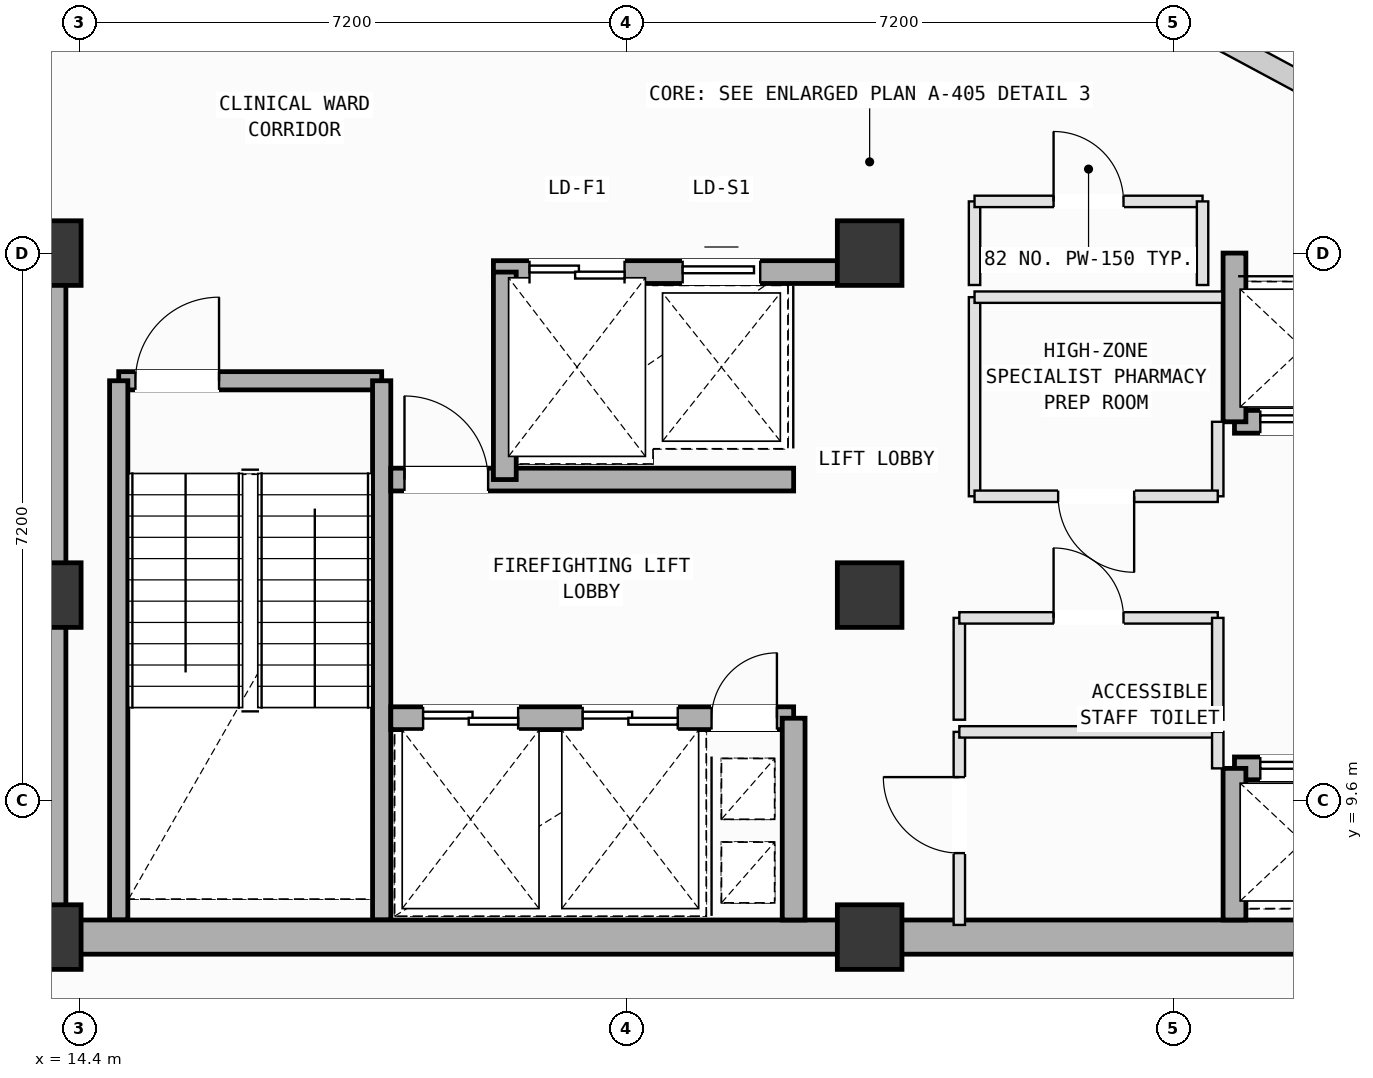
"""IFC4 building model, lengths in metres.
Left out: names, types, materials, properties, quantities, classifications, styles, units other than length and angle.
Written with IfcOpenShell. Run it as: python <this file> out.ifc"""

import sys

from ifc_helpers import new_model, si_unit, direction, frame, frame_2d, origin, origin_2d, place, context, subcontext, project, spatial, rectangle, extrude, element, fill, save


model = new_model("IFC4")
c1 = context("Model", 3, precision=1e-05, world=origin(), true_north=direction((0.0, 1.0)))
c2 = subcontext(c1, "Body", "Model", "MODEL_VIEW")
j1 = project(units=[si_unit("LENGTHUNIT", "METRE"), si_unit("PLANEANGLEUNIT", "RADIAN")], contexts=[c1])
p1 = place(None, origin())
s1 = spatial("IfcSite", under=j1, at=p1, CompositionType="ELEMENT")
p2 = place(p1, origin())
s2 = spatial("IfcBuilding", under=s1, at=p2, CompositionType="ELEMENT")
p3 = place(p2, frame((0.0, 0.0, 288.6)))
s3 = spatial("IfcBuildingStorey", under=s2, at=p3, CompositionType="ELEMENT", Elevation=288.6)
for number, where, z_axis, x_axis in (
    (1, (14.0, 7.8, 0.0), (0.0, 0.0, 1.0), (1.0, 0.0, 0.0)),
    (2, (14.0, 12.3, 0.0), (0.0, 0.0, 1.0), (1.0, 0.0, 0.0)),
    (3, (14.0, 16.8, 0.0), (0.0, 0.0, 1.0), (1.0, 0.0, 0.0)),
    (4, (24.8, 7.8, 0.0), (0.0, 0.0, 1.0), (1.0, 0.0, 0.0)),
    (5, (24.8, 12.3, 0.0), (0.0, 0.0, 1.0), (1.0, 0.0, 0.0)),
    (6, (24.8, 16.8, 0.0), (0.0, 0.0, 1.0), (1.0, 0.0, 0.0)),
):
    element("IfcColumn", number, at=place(p3, frame(where, z_axis=z_axis, x_axis=x_axis)), inside=s3, PredefinedType="COLUMN", context=c2, shape_type="SweptSolid", body=[
        extrude(rectangle(XDim=0.85, YDim=0.85, at=origin_2d()), origin(), (0.0, 0.0, 1.0), 4.0),
    ])
p4 = place(p3, frame((15.542, 5.601, 0.0), z_axis=(0.0, 0.0, 1.0), x_axis=(-0.88087851572, 0.473342413632, 0.0)))
e7 = element("IfcWall", 7, at=p4, inside=s3, PredefinedType="SOLIDWALL", context=c2, shape_type="SweptSolid", body=[
    extrude(rectangle(XDim=6.96, YDim=0.24, at=frame_2d((3.48, 0.0))), origin(), (0.0, 0.0, 1.0), 3.265),
])
p5 = place(p4, frame((3.597, 0.0, 0.0)))
e8 = element("IfcOpeningElement", 8, at=p5, cuts=e7, PredefinedType="OPENING", context=c2, shape_type="SweptSolid", body=[
    extrude(rectangle(XDim=1.1, YDim=2.15, at=frame_2d((0.55, 1.075))), frame((0.0, 0.13, 0.0), z_axis=(0.0, -1.0, 0.0), x_axis=(1.0, 0.0, 0.0)), (0.0, 0.0, 1.0), 0.26),
])
p6 = place(p3, frame((25.257, 21.847, 0.0), z_axis=(0.0, 0.0, 1.0), x_axis=(0.880904495482, -0.473294062756, 0.0)))
e9 = element("IfcWall", 9, at=p6, inside=s3, PredefinedType="SOLIDWALL", context=c2, shape_type="SweptSolid", body=[
    extrude(rectangle(XDim=6.958, YDim=0.28, at=frame_2d((3.479, 0.0))), origin(), (0.0, 0.0, 1.0), 3.165),
])
p7 = place(p3, frame((14.92, 15.12, 0.0), z_axis=(0.0, 0.0, 1.0), x_axis=(1.0, 0.0, 0.0)))
e10 = element("IfcWall", 10, at=p7, inside=s3, PredefinedType="SOLIDWALL", context=c2, shape_type="SweptSolid", body=[
    extrude(rectangle(XDim=3.46, YDim=0.24, at=frame_2d((1.73, 0.0))), origin(), (0.0, 0.0, 1.0), 3.78),
])
p8 = place(p7, frame((0.22, 0.0, 0.0)))
e11 = element("IfcOpeningElement", 11, at=p8, cuts=e10, PredefinedType="OPENING", context=c2, shape_type="SweptSolid", body=[
    extrude(rectangle(XDim=1.1, YDim=2.15, at=frame_2d((0.55, 1.075))), frame((0.0, 0.13, 0.0), z_axis=(0.0, -1.0, 0.0), x_axis=(1.0, 0.0, 0.0)), (0.0, 0.0, 1.0), 0.26),
])
for number, where, z_axis, x_axis in (
    (12, (18.38, 15.12, 0.0), (0.0, 0.0, 1.0), (0.0, -1.0, 0.0)),
    (13, (14.92, 8.025, 0.0), (0.0, 0.0, 1.0), (0.0, 1.0, 0.0)),
):
    element("IfcWall", number, at=place(p3, frame(where, z_axis=z_axis, x_axis=x_axis)), inside=s3, PredefinedType="SOLIDWALL", context=c2, shape_type="SweptSolid", body=[
        extrude(rectangle(XDim=7.095, YDim=0.24, at=frame_2d((3.548, 0.0))), origin(), (0.0, 0.0, 1.0), 3.78),
    ])
for number, where, z_axis, x_axis in (
    (14, (14.0, 7.8, 0.0), (0.0, 0.0, 1.0), (1.0, 0.0, 0.0)),
    (15, (24.8, 7.8, 0.0), (0.0, 0.0, 1.0), (1.0, 0.0, 0.0)),
):
    element("IfcWall", number, at=place(p3, frame(where, z_axis=z_axis, x_axis=x_axis)), inside=s3, PredefinedType="SHEAR", context=c2, shape_type="SweptSolid", body=[
        extrude(rectangle(XDim=10.8, YDim=0.45, at=frame_2d((5.4, 0.0))), origin(), (0.0, 0.0, 1.0), 3.78),
    ])
p9 = place(p3, frame((14.0, 16.8, 0.0), z_axis=(0.0, 0.0, 1.0), x_axis=(0.0, -1.0, 0.0)))
e16 = element("IfcWall", 16, at=p9, inside=s3, PredefinedType="SHEAR", context=c2, shape_type="SweptSolid", body=[
    extrude(rectangle(XDim=9.0, YDim=0.45, at=frame_2d((4.5, 0.0))), origin(), (0.0, 0.0, 1.0), 3.78),
])
p10 = place(p3, frame((19.85, 16.55, 0.0), z_axis=(0.0, 0.0, 1.0), x_axis=(1.0, 0.0, 0.0)))
e17 = element("IfcWall", 17, at=p10, inside=s3, PredefinedType="SOLIDWALL", context=c2, shape_type="SweptSolid", body=[
    extrude(rectangle(XDim=4.525, YDim=0.3, at=frame_2d((2.262, 0.0))), origin(), (0.0, 0.0, 1.0), 3.78),
])
p11 = place(p10, frame((0.475, 0.0, 0.0)))
e18 = element("IfcOpeningElement", 18, at=p11, cuts=e17, PredefinedType="OPENING", context=c2, shape_type="SweptSolid", body=[
    extrude(rectangle(XDim=1.25, YDim=2.18, at=frame_2d((0.625, 1.09))), frame((0.0, 0.16, 0.0), z_axis=(0.0, -1.0, 0.0), x_axis=(1.0, 0.0, 0.0)), (0.0, 0.0, 1.0), 0.32),
])
p12 = place(p10, frame((2.49, 0.0, 0.0)))
e19 = element("IfcOpeningElement", 19, at=p12, cuts=e17, PredefinedType="OPENING", context=c2, shape_type="SweptSolid", body=[
    extrude(rectangle(XDim=1.02, YDim=2.12, at=frame_2d((0.51, 1.06))), frame((0.0, 0.16, 0.0), z_axis=(0.0, -1.0, 0.0), x_axis=(1.0, 0.0, 0.0)), (0.0, 0.0, 1.0), 0.32),
])
p13 = place(p3, frame((18.5, 10.68, 0.0), z_axis=(0.0, 0.0, 1.0), x_axis=(1.0, 0.0, 0.0)))
e20 = element("IfcWall", 20, at=p13, inside=s3, PredefinedType="SOLIDWALL", context=c2, shape_type="SweptSolid", body=[
    extrude(rectangle(XDim=5.3, YDim=0.3, at=frame_2d((2.65, 0.0))), origin(), (0.0, 0.0, 1.0), 3.78),
])
p14 = place(p13, frame((4.22, 0.0, 0.0)))
e21 = element("IfcOpeningElement", 21, at=p14, cuts=e20, PredefinedType="OPENING", context=c2, shape_type="SweptSolid", body=[
    extrude(rectangle(XDim=0.86, YDim=2.06, at=frame_2d((0.43, 1.03))), frame((0.0, 0.16, 0.0), z_axis=(0.0, -1.0, 0.0), x_axis=(1.0, 0.0, 0.0)), (0.0, 0.0, 1.0), 0.32),
])
p15 = place(p13, frame((0.425, 0.0, 0.0)))
e22 = element("IfcOpeningElement", 22, at=p15, cuts=e20, PredefinedType="OPENING", context=c2, shape_type="SweptSolid", body=[
    extrude(rectangle(XDim=1.25, YDim=2.18, at=frame_2d((0.625, 1.09))), frame((0.0, 0.16, 0.0), z_axis=(0.0, -1.0, 0.0), x_axis=(1.0, 0.0, 0.0)), (0.0, 0.0, 1.0), 0.32),
])
p16 = place(p13, frame((2.525, 0.0, 0.0)))
e23 = element("IfcOpeningElement", 23, at=p16, cuts=e20, PredefinedType="OPENING", context=c2, shape_type="SweptSolid", body=[
    extrude(rectangle(XDim=1.25, YDim=2.18, at=frame_2d((0.625, 1.09))), frame((0.0, 0.16, 0.0), z_axis=(0.0, -1.0, 0.0), x_axis=(1.0, 0.0, 0.0)), (0.0, 0.0, 1.0), 0.32),
])
p17 = place(p3, frame((18.5, 13.82, 0.0), z_axis=(0.0, 0.0, 1.0), x_axis=(1.0, 0.0, 0.0)))
e24 = element("IfcWall", 24, at=p17, inside=s3, PredefinedType="SOLIDWALL", context=c2, shape_type="SweptSolid", body=[
    extrude(rectangle(XDim=5.3, YDim=0.3, at=frame_2d((2.65, 0.0))), origin(), (0.0, 0.0, 1.0), 3.78),
])
p18 = place(p17, frame((0.18, 0.0, 0.0)))
e25 = element("IfcOpeningElement", 25, at=p18, cuts=e24, PredefinedType="OPENING", context=c2, shape_type="SweptSolid", body=[
    extrude(rectangle(XDim=1.1, YDim=2.15, at=frame_2d((0.55, 1.075))), frame((0.0, 0.16, 0.0), z_axis=(0.0, -1.0, 0.0), x_axis=(1.0, 0.0, 0.0)), (0.0, 0.0, 1.0), 0.32),
])
p19 = place(p3, frame((23.8, 8.025, 0.0), z_axis=(0.0, 0.0, 1.0), x_axis=(0.0, 1.0, 0.0)))
e26 = element("IfcWall", 26, at=p19, inside=s3, PredefinedType="SOLIDWALL", context=c2, shape_type="SweptSolid", body=[
    extrude(rectangle(XDim=2.655, YDim=0.3, at=frame_2d((1.328, 0.0))), origin(), (0.0, 0.0, 1.0), 3.78),
])
p20 = place(p3, frame((20.0, 13.82, 0.0), z_axis=(0.0, 0.0, 1.0), x_axis=(0.0, 1.0, 0.0)))
e27 = element("IfcWall", 27, at=p20, inside=s3, PredefinedType="SOLIDWALL", context=c2, shape_type="SweptSolid", body=[
    extrude(rectangle(XDim=2.73, YDim=0.3, at=frame_2d((1.365, 0.0))), origin(), (0.0, 0.0, 1.0), 3.78),
])
p21 = place(p3, frame((29.6, 10.02, 0.0), z_axis=(0.0, 0.0, 1.0), x_axis=(1.0, 0.0, 0.0)))
e28 = element("IfcWall", 28, at=p21, inside=s3, PredefinedType="SOLIDWALL", context=c2, shape_type="SweptSolid", body=[
    extrude(rectangle(XDim=1.7, YDim=0.3, at=frame_2d((0.85, 0.0))), origin(), (0.0, 0.0, 1.0), 3.78),
])
p22 = place(p21, frame((0.34, 0.0, 0.0)))
e29 = element("IfcOpeningElement", 29, at=p22, cuts=e28, PredefinedType="OPENING", context=c2, shape_type="SweptSolid", body=[
    extrude(rectangle(XDim=1.12, YDim=2.15, at=frame_2d((0.56, 1.075))), frame((0.0, 0.16, 0.0), z_axis=(0.0, -1.0, 0.0), x_axis=(1.0, 0.0, 0.0)), (0.0, 0.0, 1.0), 0.32),
])
p23 = place(p3, frame((29.6, 8.025, 0.0), z_axis=(0.0, 0.0, 1.0), x_axis=(0.0, 1.0, 0.0)))
e30 = element("IfcWall", 30, at=p23, inside=s3, PredefinedType="SOLIDWALL", context=c2, shape_type="SweptSolid", body=[
    extrude(rectangle(XDim=1.995, YDim=0.3, at=frame_2d((0.998, 0.0))), origin(), (0.0, 0.0, 1.0), 3.78),
])
p24 = place(p3, frame((29.6, 14.58, 0.0), z_axis=(0.0, 0.0, 1.0), x_axis=(1.0, 0.0, 0.0)))
e31 = element("IfcWall", 31, at=p24, inside=s3, PredefinedType="SOLIDWALL", context=c2, shape_type="SweptSolid", body=[
    extrude(rectangle(XDim=1.7, YDim=0.3, at=frame_2d((0.85, 0.0))), origin(), (0.0, 0.0, 1.0), 3.78),
])
p25 = place(p24, frame((0.34, 0.0, 0.0)))
e32 = element("IfcOpeningElement", 32, at=p25, cuts=e31, PredefinedType="OPENING", context=c2, shape_type="SweptSolid", body=[
    extrude(rectangle(XDim=1.12, YDim=2.15, at=frame_2d((0.56, 1.075))), frame((0.0, 0.16, 0.0), z_axis=(0.0, -1.0, 0.0), x_axis=(1.0, 0.0, 0.0)), (0.0, 0.0, 1.0), 0.32),
])
p26 = place(p3, frame((29.6, 14.58, 0.0), z_axis=(0.0, 0.0, 1.0), x_axis=(0.0, 1.0, 0.0)))
e33 = element("IfcWall", 33, at=p26, inside=s3, PredefinedType="SOLIDWALL", context=c2, shape_type="SweptSolid", body=[
    extrude(rectangle(XDim=2.22, YDim=0.3, at=frame_2d((1.11, 0.0))), origin(), (0.0, 0.0, 1.0), 3.78),
])
p27 = place(p3, frame((25.98, 7.96, 0.0), z_axis=(0.0, 0.0, 1.0), x_axis=(0.0, 1.0, 0.0)))
e34 = element("IfcWall", 34, at=p27, inside=s3, PredefinedType="PARTITIONING", context=c2, shape_type="SweptSolid", body=[
    extrude(rectangle(XDim=2.54, YDim=0.15, at=frame_2d((1.27, 0.0))), origin(), (0.0, 0.0, 1.0), 3.78),
])
p28 = place(p27, frame((0.945, 0.0, 0.0)))
e35 = element("IfcOpeningElement", 35, at=p28, cuts=e34, PredefinedType="OPENING", context=c2, shape_type="SweptSolid", body=[
    extrude(rectangle(XDim=1.0, YDim=2.12, at=frame_2d((0.5, 1.06))), frame((0.0, 0.085, 0.0), z_axis=(0.0, -1.0, 0.0), x_axis=(1.0, 0.0, 0.0)), (0.0, 0.0, 1.0), 0.17),
])
p29 = place(p3, frame((25.98, 10.5, 0.0), z_axis=(0.0, 0.0, 1.0), x_axis=(1.0, 0.0, 0.0)))
e36 = element("IfcWall", 36, at=p29, inside=s3, PredefinedType="PARTITIONING", context=c2, shape_type="SweptSolid", body=[
    extrude(rectangle(XDim=3.4, YDim=0.15, at=frame_2d((1.7, 0.0))), origin(), (0.0, 0.0, 1.0), 3.78),
])
p30 = place(p3, frame((29.38, 10.5, 0.0), z_axis=(0.0, 0.0, 1.0), x_axis=(0.0, -1.0, 0.0)))
e37 = element("IfcWall", 37, at=p30, inside=s3, PredefinedType="PARTITIONING", context=c2, shape_type="SweptSolid", body=[
    extrude(rectangle(XDim=0.48, YDim=0.15, at=frame_2d((0.24, 0.0))), origin(), (0.0, 0.0, 1.0), 3.78),
])
p31 = place(p3, frame((25.98, 10.66, 0.0), z_axis=(0.0, 0.0, 1.0), x_axis=(0.0, 1.0, 0.0)))
e38 = element("IfcWall", 38, at=p31, inside=s3, PredefinedType="PARTITIONING", context=c2, shape_type="SweptSolid", body=[
    extrude(rectangle(XDim=1.34, YDim=0.15, at=frame_2d((0.67, 0.0))), origin(), (0.0, 0.0, 1.0), 3.78),
])
p32 = place(p3, frame((25.98, 12.0, 0.0), z_axis=(0.0, 0.0, 1.0), x_axis=(1.0, 0.0, 0.0)))
e39 = element("IfcWall", 39, at=p32, inside=s3, PredefinedType="PARTITIONING", context=c2, shape_type="SweptSolid", body=[
    extrude(rectangle(XDim=3.4, YDim=0.15, at=frame_2d((1.7, 0.0))), origin(), (0.0, 0.0, 1.0), 3.78),
])
p33 = place(p32, frame((1.24, 0.0, 0.0)))
e40 = element("IfcOpeningElement", 40, at=p33, cuts=e39, PredefinedType="OPENING", context=c2, shape_type="SweptSolid", body=[
    extrude(rectangle(XDim=0.92, YDim=2.1, at=frame_2d((0.46, 1.05))), frame((0.0, 0.085, 0.0), z_axis=(0.0, -1.0, 0.0), x_axis=(1.0, 0.0, 0.0)), (0.0, 0.0, 1.0), 0.17),
])
p34 = place(p3, frame((29.38, 12.0, 0.0), z_axis=(0.0, 0.0, 1.0), x_axis=(0.0, -1.0, 0.0)))
e41 = element("IfcWall", 41, at=p34, inside=s3, PredefinedType="PARTITIONING", context=c2, shape_type="SweptSolid", body=[
    extrude(rectangle(XDim=1.34, YDim=0.15, at=frame_2d((0.67, 0.0))), origin(), (0.0, 0.0, 1.0), 3.78),
])
p35 = place(p3, frame((26.18, 13.6, 0.0), z_axis=(0.0, 0.0, 1.0), x_axis=(0.0, 1.0, 0.0)))
e42 = element("IfcWall", 42, at=p35, inside=s3, PredefinedType="PARTITIONING", context=c2, shape_type="SweptSolid", body=[
    extrude(rectangle(XDim=2.62, YDim=0.15, at=frame_2d((1.31, 0.0))), origin(), (0.0, 0.0, 1.0), 3.78),
])
p36 = place(p3, frame((26.18, 16.22, 0.0), z_axis=(0.0, 0.0, 1.0), x_axis=(1.0, 0.0, 0.0)))
e43 = element("IfcWall", 43, at=p36, inside=s3, PredefinedType="PARTITIONING", context=c2, shape_type="SweptSolid", body=[
    extrude(rectangle(XDim=3.26, YDim=0.15, at=frame_2d((1.63, 0.0))), origin(), (0.0, 0.0, 1.0), 3.78),
])
p37 = place(p3, frame((29.38, 14.58, 0.0), z_axis=(0.0, 0.0, 1.0), x_axis=(0.0, -1.0, 0.0)))
e44 = element("IfcWall", 44, at=p37, inside=s3, PredefinedType="PARTITIONING", context=c2, shape_type="SweptSolid", body=[
    extrude(rectangle(XDim=0.98, YDim=0.15, at=frame_2d((0.49, 0.0))), origin(), (0.0, 0.0, 1.0), 3.78),
])
p38 = place(p3, frame((29.38, 13.6, 0.0), z_axis=(0.0, 0.0, 1.0), x_axis=(-1.0, 0.0, 0.0)))
e45 = element("IfcWall", 45, at=p38, inside=s3, PredefinedType="PARTITIONING", context=c2, shape_type="SweptSolid", body=[
    extrude(rectangle(XDim=3.2, YDim=0.15, at=frame_2d((1.6, 0.0))), origin(), (0.0, 0.0, 1.0), 3.78),
])
p39 = place(p38, frame((1.1, 0.0, 0.0)))
e46 = element("IfcOpeningElement", 46, at=p39, cuts=e45, PredefinedType="OPENING", context=c2, shape_type="SweptSolid", body=[
    extrude(rectangle(XDim=1.0, YDim=2.12, at=frame_2d((0.5, 1.06))), frame((0.0, 0.085, 0.0), z_axis=(0.0, -1.0, 0.0), x_axis=(1.0, 0.0, 0.0)), (0.0, 0.0, 1.0), 0.17),
])
p40 = place(p3, frame((26.18, 16.38, 0.0), z_axis=(0.0, 0.0, 1.0), x_axis=(0.0, 1.0, 0.0)))
e47 = element("IfcWall", 47, at=p40, inside=s3, PredefinedType="PARTITIONING", context=c2, shape_type="SweptSolid", body=[
    extrude(rectangle(XDim=1.1, YDim=0.15, at=frame_2d((0.55, 0.0))), origin(), (0.0, 0.0, 1.0), 3.78),
])
p41 = place(p3, frame((26.18, 17.48, 0.0), z_axis=(0.0, 0.0, 1.0), x_axis=(1.0, 0.0, 0.0)))
e48 = element("IfcWall", 48, at=p41, inside=s3, PredefinedType="PARTITIONING", context=c2, shape_type="SweptSolid", body=[
    extrude(rectangle(XDim=3.0, YDim=0.15, at=frame_2d((1.5, 0.0))), origin(), (0.0, 0.0, 1.0), 3.78),
])
p42 = place(p41, frame((1.04, 0.0, 0.0)))
e49 = element("IfcOpeningElement", 49, at=p42, cuts=e48, PredefinedType="OPENING", context=c2, shape_type="SweptSolid", body=[
    extrude(rectangle(XDim=0.92, YDim=2.1, at=frame_2d((0.46, 1.05))), frame((0.0, 0.085, 0.0), z_axis=(0.0, -1.0, 0.0), x_axis=(1.0, 0.0, 0.0)), (0.0, 0.0, 1.0), 0.17),
])
p43 = place(p3, frame((29.18, 17.48, 0.0), z_axis=(0.0, 0.0, 1.0), x_axis=(0.0, -1.0, 0.0)))
e50 = element("IfcWall", 50, at=p43, inside=s3, PredefinedType="PARTITIONING", context=c2, shape_type="SweptSolid", body=[
    extrude(rectangle(XDim=1.1, YDim=0.15, at=frame_2d((0.55, 0.0))), origin(), (0.0, 0.0, 1.0), 3.78),
])
p44 = place(p8, origin())
e51 = element("IfcDoor", 51, at=p44, inside=s3, OperationType="SINGLE_SWING_RIGHT", PredefinedType="DOOR", context=c2, shape_type="SweptSolid", body=[
    extrude(rectangle(XDim=1.1, YDim=2.15, at=frame_2d((0.55, 1.075))), frame((0.0, 0.025, 0.0), z_axis=(0.0, -1.0, 0.0), x_axis=(1.0, 0.0, 0.0)), (0.0, 0.0, 1.0), 0.05),
])
fill(e11, e51)
p45 = place(p14, origin())
e52 = element("IfcDoor", 52, at=p45, inside=s3, OperationType="SINGLE_SWING_RIGHT", PredefinedType="DOOR", context=c2, shape_type="SweptSolid", body=[
    extrude(rectangle(XDim=0.86, YDim=2.06, at=frame_2d((0.43, 1.03))), frame((0.0, 0.025, 0.0), z_axis=(0.0, -1.0, 0.0), x_axis=(1.0, 0.0, 0.0)), (0.0, 0.0, 1.0), 0.05),
])
fill(e21, e52)
p46 = place(p18, origin())
e53 = element("IfcDoor", 53, at=p46, inside=s3, OperationType="SINGLE_SWING_LEFT", PredefinedType="DOOR", context=c2, shape_type="SweptSolid", body=[
    extrude(rectangle(XDim=1.1, YDim=2.15, at=frame_2d((0.55, 1.075))), frame((0.0, 0.025, 0.0), z_axis=(0.0, -1.0, 0.0), x_axis=(1.0, 0.0, 0.0)), (0.0, 0.0, 1.0), 0.05),
])
fill(e25, e53)
p47 = place(p15, origin())
e54 = element("IfcDoor", 54, at=p47, inside=s3, OperationType="DOUBLE_DOOR_SLIDING", PredefinedType="DOOR", context=c2, shape_type="SweptSolid", body=[
    extrude(rectangle(XDim=1.25, YDim=2.18, at=frame_2d((0.625, 1.09))), frame((0.0, 0.025, 0.0), z_axis=(0.0, -1.0, 0.0), x_axis=(1.0, 0.0, 0.0)), (0.0, 0.0, 1.0), 0.05),
])
fill(e22, e54)
p48 = place(p16, origin())
e55 = element("IfcDoor", 55, at=p48, inside=s3, OperationType="DOUBLE_DOOR_SLIDING", PredefinedType="DOOR", context=c2, shape_type="SweptSolid", body=[
    extrude(rectangle(XDim=1.25, YDim=2.18, at=frame_2d((0.625, 1.09))), frame((0.0, 0.025, 0.0), z_axis=(0.0, -1.0, 0.0), x_axis=(1.0, 0.0, 0.0)), (0.0, 0.0, 1.0), 0.05),
])
fill(e23, e55)
p49 = place(p22, origin())
e56 = element("IfcDoor", 56, at=p49, inside=s3, OperationType="DOUBLE_DOOR_SLIDING", PredefinedType="DOOR", context=c2, shape_type="SweptSolid", body=[
    extrude(rectangle(XDim=1.12, YDim=2.15, at=frame_2d((0.56, 1.075))), frame((0.0, 0.025, 0.0), z_axis=(0.0, -1.0, 0.0), x_axis=(1.0, 0.0, 0.0)), (0.0, 0.0, 1.0), 0.05),
])
fill(e29, e56)
p50 = place(p25, origin())
e57 = element("IfcDoor", 57, at=p50, inside=s3, OperationType="DOUBLE_DOOR_SLIDING", PredefinedType="DOOR", context=c2, shape_type="SweptSolid", body=[
    extrude(rectangle(XDim=1.12, YDim=2.15, at=frame_2d((0.56, 1.075))), frame((0.0, 0.025, 0.0), z_axis=(0.0, -1.0, 0.0), x_axis=(1.0, 0.0, 0.0)), (0.0, 0.0, 1.0), 0.05),
])
fill(e32, e57)
p51 = place(p11, origin())
e58 = element("IfcDoor", 58, at=p51, inside=s3, OperationType="DOUBLE_DOOR_SLIDING", PredefinedType="DOOR", context=c2, shape_type="SweptSolid", body=[
    extrude(rectangle(XDim=1.25, YDim=2.18, at=frame_2d((0.625, 1.09))), frame((0.0, 0.025, 0.0), z_axis=(0.0, -1.0, 0.0), x_axis=(1.0, 0.0, 0.0)), (0.0, 0.0, 1.0), 0.05),
])
fill(e18, e58)
p52 = place(p12, origin())
e59 = element("IfcDoor", 59, at=p52, inside=s3, OperationType="SLIDING_TO_LEFT", PredefinedType="DOOR", context=c2, shape_type="SweptSolid", body=[
    extrude(rectangle(XDim=1.02, YDim=2.12, at=frame_2d((0.51, 1.06))), frame((0.0, 0.025, 0.0), z_axis=(0.0, -1.0, 0.0), x_axis=(1.0, 0.0, 0.0)), (0.0, 0.0, 1.0), 0.05),
])
fill(e19, e59)
p53 = place(p28, origin())
e60 = element("IfcDoor", 60, at=p53, inside=s3, OperationType="SINGLE_SWING_RIGHT", PredefinedType="DOOR", context=c2, shape_type="SweptSolid", body=[
    extrude(rectangle(XDim=1.0, YDim=2.12, at=frame_2d((0.5, 1.06))), frame((0.0, 0.025, 0.0), z_axis=(0.0, -1.0, 0.0), x_axis=(1.0, 0.0, 0.0)), (0.0, 0.0, 1.0), 0.05),
])
fill(e35, e60)
p54 = place(p33, origin())
e61 = element("IfcDoor", 61, at=p54, inside=s3, OperationType="SINGLE_SWING_LEFT", PredefinedType="DOOR", context=c2, shape_type="SweptSolid", body=[
    extrude(rectangle(XDim=0.92, YDim=2.1, at=frame_2d((0.46, 1.05))), frame((0.0, 0.025, 0.0), z_axis=(0.0, -1.0, 0.0), x_axis=(1.0, 0.0, 0.0)), (0.0, 0.0, 1.0), 0.05),
])
fill(e40, e61)
p55 = place(p39, origin())
e62 = element("IfcDoor", 62, at=p55, inside=s3, OperationType="SINGLE_SWING_LEFT", PredefinedType="DOOR", context=c2, shape_type="SweptSolid", body=[
    extrude(rectangle(XDim=1.0, YDim=2.12, at=frame_2d((0.5, 1.06))), frame((0.0, 0.025, 0.0), z_axis=(0.0, -1.0, 0.0), x_axis=(1.0, 0.0, 0.0)), (0.0, 0.0, 1.0), 0.05),
])
fill(e46, e62)
p56 = place(p42, origin())
e63 = element("IfcDoor", 63, at=p56, inside=s3, OperationType="SINGLE_SWING_LEFT", PredefinedType="DOOR", context=c2, shape_type="SweptSolid", body=[
    extrude(rectangle(XDim=0.92, YDim=2.1, at=frame_2d((0.46, 1.05))), frame((0.0, 0.025, 0.0), z_axis=(0.0, -1.0, 0.0), x_axis=(1.0, 0.0, 0.0)), (0.0, 0.0, 1.0), 0.05),
])
fill(e49, e63)
save(model, sys.argv[1])
